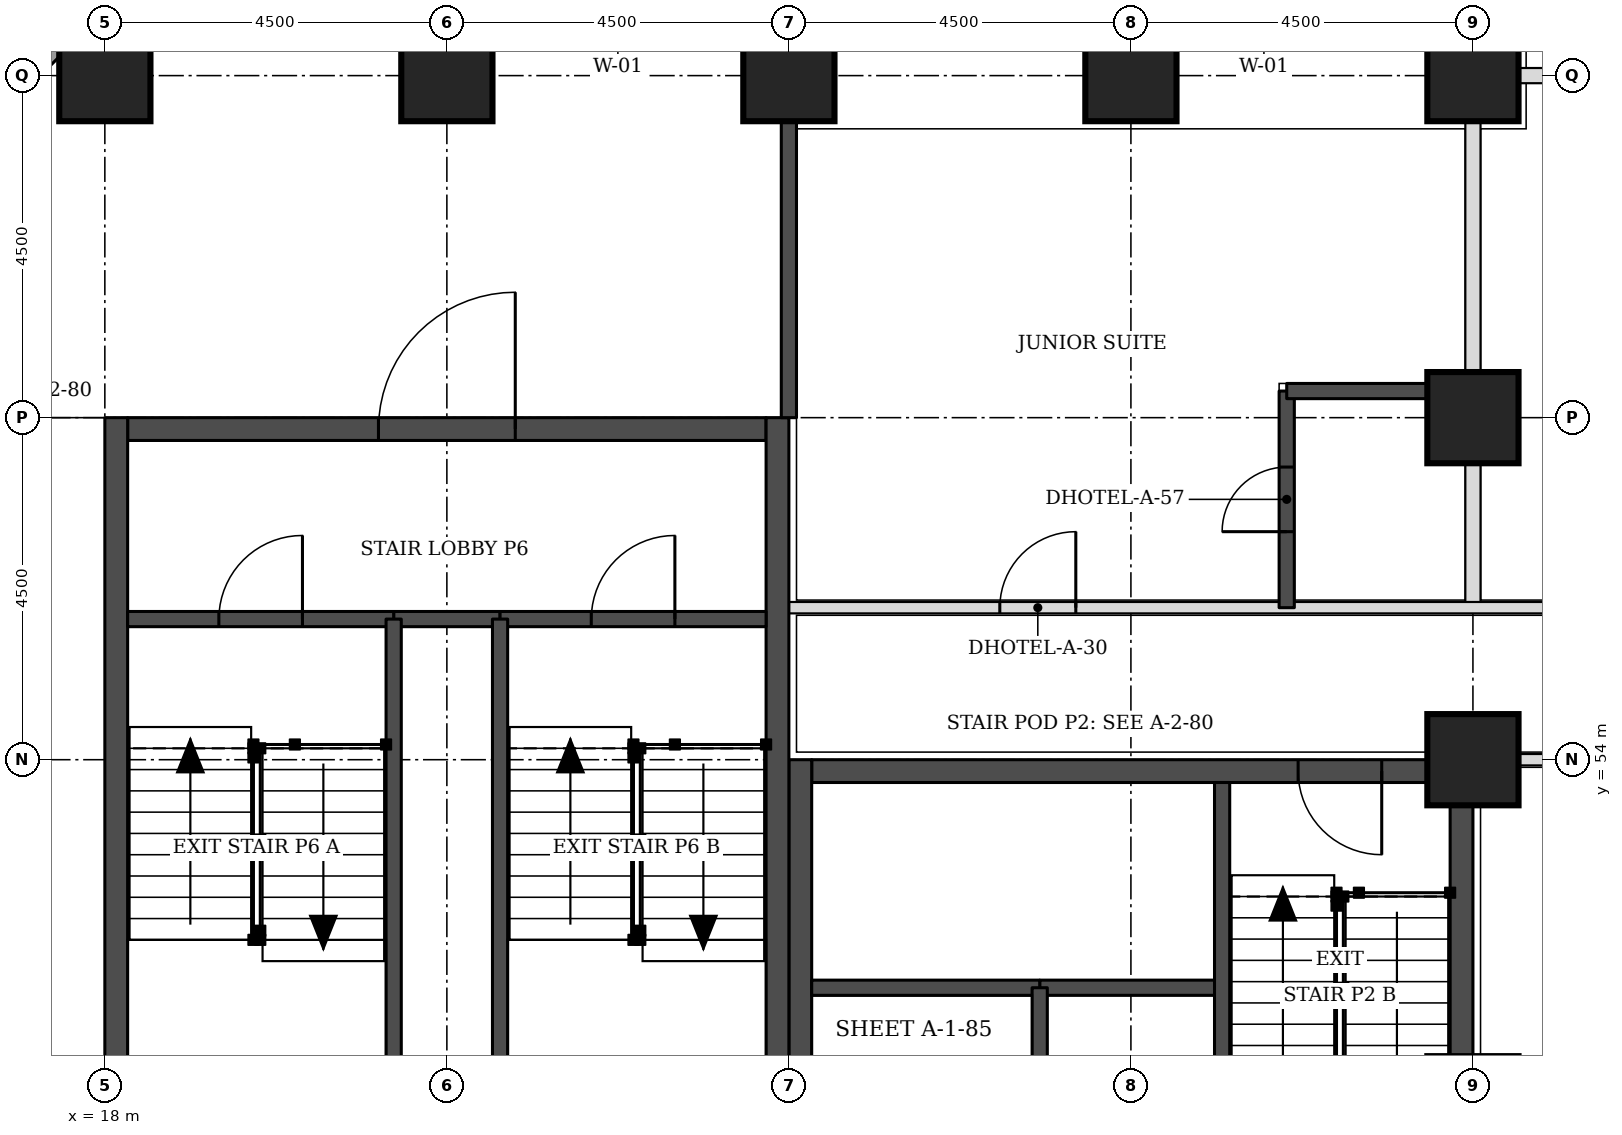
"""IFC4 building model, lengths in metres.
Left out: names, types, materials, properties, quantities, classifications, styles, units other than length and angle.
Written with IfcOpenShell. Run it as: python <this file> out.ifc"""

import sys

from ifc_helpers import new_model, si_unit, direction, frame, frame_2d, origin, origin_2d, place, context, subcontext, project, spatial, rectangle, extrude, element, fill, save


model = new_model("IFC4")
c1 = context("Model", 3, precision=1e-05, world=origin(), true_north=direction((0.0, 1.0)))
c2 = subcontext(c1, "Body", "Model", "MODEL_VIEW")
j1 = project(units=[si_unit("LENGTHUNIT", "METRE"), si_unit("PLANEANGLEUNIT", "RADIAN")], contexts=[c1])
p1 = place(None, origin())
s1 = spatial("IfcSite", under=j1, at=p1, CompositionType="ELEMENT")
p2 = place(p1, origin())
s2 = spatial("IfcBuilding", under=s1, at=p2, CompositionType="ELEMENT")
p3 = place(p2, frame((0.0, 0.0, 49.5)))
s3 = spatial("IfcBuildingStorey", under=s2, at=p3, CompositionType="ELEMENT", Elevation=49.5)
for number, where, z_axis, x_axis in (
    (1, (36.0, 54.0, 0.0), (0.0, 0.0, 1.0), (1.0, 0.0, 0.0)),
    (2, (36.0, 58.5, 0.0), (0.0, 0.0, 1.0), (1.0, 0.0, 0.0)),
    (3, (18.0, 63.0, 0.0), (0.0, 0.0, 1.0), (1.0, 0.0, 0.0)),
    (4, (22.5, 63.0, 0.0), (0.0, 0.0, 1.0), (1.0, 0.0, 0.0)),
    (5, (27.0, 63.0, 0.0), (0.0, 0.0, 1.0), (1.0, 0.0, 0.0)),
    (6, (31.5, 63.0, 0.0), (0.0, 0.0, 1.0), (1.0, 0.0, 0.0)),
    (7, (36.0, 63.0, 0.0), (0.0, 0.0, 1.0), (1.0, 0.0, 0.0)),
):
    element("IfcColumn", number, at=place(p3, frame(where, z_axis=z_axis, x_axis=x_axis)), inside=s3, PredefinedType="COLUMN", context=c2, shape_type="SweptSolid", body=[
        extrude(rectangle(XDim=1.2, YDim=1.2, at=origin_2d()), origin(), (0.0, 0.0, 1.0), 3.3),
    ])
p4 = place(p3, frame((27.3, 53.85, 0.0), z_axis=(0.0, 0.0, 1.0), x_axis=(1.0, 0.0, 0.0)))
e8 = element("IfcWall", 8, at=p4, inside=s3, PredefinedType="SHEAR", context=c2, shape_type="SweptSolid", body=[
    extrude(rectangle(XDim=8.4, YDim=0.3, at=frame_2d((4.2, 0.0))), origin(), (0.0, 0.0, 1.0), 3.3),
])
p5 = place(p4, frame((6.4, 0.0, 0.0)))
e9 = element("IfcOpeningElement", 9, at=p5, cuts=e8, PredefinedType="OPENING", context=c2, shape_type="SweptSolid", body=[
    extrude(rectangle(XDim=1.1, YDim=2.1, at=frame_2d((0.55, 1.05))), frame((0.0, 0.16, 0.0), z_axis=(0.0, -1.0, 0.0), x_axis=(1.0, 0.0, 0.0)), (0.0, 0.0, 1.0), 0.32),
])
p6 = place(p3, frame((27.15, 45.0, 0.0), z_axis=(0.0, 0.0, 1.0), x_axis=(0.0, 1.0, 0.0)))
e10 = element("IfcWall", 10, at=p6, inside=s3, PredefinedType="SHEAR", context=c2, shape_type="SweptSolid", body=[
    extrude(rectangle(XDim=9.0, YDim=0.3, at=frame_2d((4.5, 0.0))), origin(), (0.0, 0.0, 1.0), 3.3),
])
p7 = place(p6, frame((0.4, 0.0, 0.0)))
e11 = element("IfcOpeningElement", 11, at=p7, cuts=e10, PredefinedType="OPENING", context=c2, shape_type="SweptSolid", body=[
    extrude(rectangle(XDim=1.1, YDim=2.1, at=frame_2d((0.55, 1.05))), frame((0.0, 0.16, 0.0), z_axis=(0.0, -1.0, 0.0), x_axis=(1.0, 0.0, 0.0)), (0.0, 0.0, 1.0), 0.32),
])
p8 = place(p3, frame((35.85, 45.0, 0.0), z_axis=(0.0, 0.0, 1.0), x_axis=(0.0, 1.0, 0.0)))
e12 = element("IfcWall", 12, at=p8, inside=s3, PredefinedType="SHEAR", context=c2, shape_type="SweptSolid", body=[
    extrude(rectangle(XDim=9.0, YDim=0.3, at=frame_2d((4.5, 0.0))), origin(), (0.0, 0.0, 1.0), 3.3),
])
p9 = place(p3, frame((18.3, 58.35, 0.0), z_axis=(0.0, 0.0, 1.0), x_axis=(1.0, 0.0, 0.0)))
e13 = element("IfcWall", 13, at=p9, inside=s3, PredefinedType="SHEAR", context=c2, shape_type="SweptSolid", body=[
    extrude(rectangle(XDim=8.4, YDim=0.3, at=frame_2d((4.2, 0.0))), origin(), (0.0, 0.0, 1.0), 3.3),
])
p10 = place(p9, frame((3.3, 0.0, 0.0)))
e14 = element("IfcOpeningElement", 14, at=p10, cuts=e13, PredefinedType="OPENING", context=c2, shape_type="SweptSolid", body=[
    extrude(rectangle(XDim=1.8, YDim=2.1, at=frame_2d((0.9, 1.05))), frame((0.0, 0.16, 0.0), z_axis=(0.0, -1.0, 0.0), x_axis=(1.0, 0.0, 0.0)), (0.0, 0.0, 1.0), 0.32),
])
for number, where, z_axis, x_axis in (
    (15, (18.15, 49.5, 0.0), (0.0, 0.0, 1.0), (0.0, 1.0, 0.0)),
    (16, (26.85, 49.5, 0.0), (0.0, 0.0, 1.0), (0.0, 1.0, 0.0)),
):
    element("IfcWall", number, at=place(p3, frame(where, z_axis=z_axis, x_axis=x_axis)), inside=s3, PredefinedType="SHEAR", context=c2, shape_type="SweptSolid", body=[
        extrude(rectangle(XDim=9.0, YDim=0.3, at=frame_2d((4.5, 0.0))), origin(), (0.0, 0.0, 1.0), 3.3),
    ])
p11 = place(p3, frame((17.73, 63.826, 0.0), z_axis=(0.0, 0.0, 1.0), x_axis=(-0.707106781187, -0.707106781187, 0.0)))
e17 = element("IfcWall", 17, at=p11, inside=s3, PredefinedType="STANDARD", context=c2, shape_type="SweptSolid", body=[
    extrude(rectangle(XDim=7.151, YDim=0.35, at=frame_2d((3.576, 0.0))), origin(), (0.0, 0.0, 1.0), 3.055),
])
p12 = place(p11, frame((1.926, 0.0, 0.8)))
e18 = element("IfcOpeningElement", 18, at=p12, cuts=e17, PredefinedType="OPENING", context=c2, shape_type="SweptSolid", body=[
    extrude(rectangle(XDim=3.3, YDim=1.5, at=frame_2d((1.65, 0.75))), frame((0.0, 0.185, 0.0), z_axis=(0.0, -1.0, 0.0), x_axis=(1.0, 0.0, 0.0)), (0.0, 0.0, 1.0), 0.37),
])
p13 = place(p3, frame((36.0, 56.0, 0.0), z_axis=(0.0, 0.0, 1.0), x_axis=(0.0, 1.0, 0.0)))
e19 = element("IfcWall", 19, at=p13, inside=s3, PredefinedType="PARTITIONING", context=c2, shape_type="SweptSolid", body=[
    extrude(rectangle(XDim=6.4, YDim=0.2, at=frame_2d((3.2, 0.0))), origin(), (0.0, 0.0, 1.0), 2.33),
])
p14 = place(p3, frame((36.6, 63.0, 0.0), z_axis=(0.0, 0.0, 1.0), x_axis=(1.0, 0.0, 0.0)))
e20 = element("IfcWall", 20, at=p14, inside=s3, PredefinedType="PARTITIONING", context=c2, shape_type="SweptSolid", body=[
    extrude(rectangle(XDim=6.4, YDim=0.2, at=frame_2d((3.2, 0.0))), origin(), (0.0, 0.0, 1.0), 3.08),
])
p15 = place(p3, frame((36.05, 54.0, 0.0), z_axis=(0.0, 0.0, 1.0), x_axis=(1.0, 0.0, 0.0)))
e21 = element("IfcWall", 21, at=p15, inside=s3, PredefinedType="PARTITIONING", context=c2, shape_type="SweptSolid", body=[
    extrude(rectangle(XDim=6.95, YDim=0.15, at=frame_2d((3.475, 0.0))), origin(), (0.0, 0.0, 1.0), 3.08),
])
p16 = place(p15, frame((3.0, 0.0, 0.0)))
e22 = element("IfcOpeningElement", 22, at=p16, cuts=e21, PredefinedType="OPENING", context=c2, shape_type="SweptSolid", body=[
    extrude(rectangle(XDim=0.9, YDim=2.1, at=frame_2d((0.45, 1.05))), frame((0.0, 0.085, 0.0), z_axis=(0.0, -1.0, 0.0), x_axis=(1.0, 0.0, 0.0)), (0.0, 0.0, 1.0), 0.17),
])
p17 = place(p3, frame((27.0, 56.0, 0.0), z_axis=(0.0, 0.0, 1.0), x_axis=(1.0, 0.0, 0.0)))
e23 = element("IfcWall", 23, at=p17, inside=s3, PredefinedType="PARTITIONING", context=c2, shape_type="SweptSolid", body=[
    extrude(rectangle(XDim=16.0, YDim=0.15, at=frame_2d((8.0, 0.0))), origin(), (0.0, 0.0, 1.0), 3.08),
])
p18 = place(p17, frame((2.775, 0.0, 0.0)))
e24 = element("IfcOpeningElement", 24, at=p18, cuts=e23, PredefinedType="OPENING", context=c2, shape_type="SweptSolid", body=[
    extrude(rectangle(XDim=1.0, YDim=2.1, at=frame_2d((0.5, 1.05))), frame((0.0, 0.085, 0.0), z_axis=(0.0, -1.0, 0.0), x_axis=(1.0, 0.0, 0.0)), (0.0, 0.0, 1.0), 0.17),
])
p19 = place(p3, frame((27.0, 58.5, 0.0), z_axis=(0.0, 0.0, 1.0), x_axis=(0.0, 1.0, 0.0)))
e25 = element("IfcWall", 25, at=p19, inside=s3, PredefinedType="SOLIDWALL", context=c2, shape_type="SweptSolid", body=[
    extrude(rectangle(XDim=3.9, YDim=0.2, at=frame_2d((1.95, 0.0))), origin(), (0.0, 0.0, 1.0), 3.08),
])
p20 = place(p3, frame((33.55, 56.0, 0.0), z_axis=(0.0, 0.0, 1.0), x_axis=(0.0, 1.0, 0.0)))
e26 = element("IfcWall", 26, at=p20, inside=s3, PredefinedType="SOLIDWALL", context=c2, shape_type="SweptSolid", body=[
    extrude(rectangle(XDim=2.85, YDim=0.2, at=frame_2d((1.425, 0.0))), origin(), (0.0, 0.0, 1.0), 3.08),
])
p21 = place(p20, frame((1.0, 0.0, 0.0)))
e27 = element("IfcOpeningElement", 27, at=p21, cuts=e26, PredefinedType="OPENING", context=c2, shape_type="SweptSolid", body=[
    extrude(rectangle(XDim=0.85, YDim=2.1, at=frame_2d((0.425, 1.05))), frame((0.0, 0.11, 0.0), z_axis=(0.0, -1.0, 0.0), x_axis=(1.0, 0.0, 0.0)), (0.0, 0.0, 1.0), 0.22),
])
p22 = place(p3, frame((33.55, 58.85, 0.0), z_axis=(0.0, 0.0, 1.0), x_axis=(1.0, 0.0, 0.0)))
e28 = element("IfcWall", 28, at=p22, inside=s3, PredefinedType="SOLIDWALL", context=c2, shape_type="SweptSolid", body=[
    extrude(rectangle(XDim=2.45, YDim=0.2, at=frame_2d((1.225, 0.0))), origin(), (0.0, 0.0, 1.0), 3.08),
])
p23 = place(p3, frame((30.3, 51.0, 0.0), z_axis=(0.0, 0.0, 1.0), x_axis=(1.0, 0.0, 0.0)))
e29 = element("IfcWall", 29, at=p23, inside=s3, PredefinedType="SOLIDWALL", context=c2, shape_type="SweptSolid", body=[
    extrude(rectangle(XDim=2.4, YDim=0.2, at=frame_2d((1.2, 0.0))), origin(), (0.0, 0.0, 1.0), 3.3),
])
p24 = place(p3, frame((27.3, 51.0, 0.0), z_axis=(0.0, 0.0, 1.0), x_axis=(1.0, 0.0, 0.0)))
e30 = element("IfcWall", 30, at=p24, inside=s3, PredefinedType="SOLIDWALL", context=c2, shape_type="SweptSolid", body=[
    extrude(rectangle(XDim=3.0, YDim=0.2, at=frame_2d((1.5, 0.0))), origin(), (0.0, 0.0, 1.0), 3.08),
])
for number, where, z_axis, x_axis in (
    (31, (30.3, 45.3, 0.0), (0.0, 0.0, 1.0), (0.0, 1.0, 0.0)),
    (32, (32.7, 48.0, 0.0), (0.0, 0.0, 1.0), (0.0, 1.0, 0.0)),
):
    element("IfcWall", number, at=place(p3, frame(where, z_axis=z_axis, x_axis=x_axis)), inside=s3, PredefinedType="SOLIDWALL", context=c2, shape_type="SweptSolid", body=[
        extrude(rectangle(XDim=5.7, YDim=0.2, at=frame_2d((2.85, 0.0))), origin(), (0.0, 0.0, 1.0), 3.08),
    ])
p25 = place(p3, frame((21.8, 55.85, 0.0), z_axis=(0.0, 0.0, 1.0), x_axis=(1.0, 0.0, 0.0)))
e33 = element("IfcWall", 33, at=p25, inside=s3, PredefinedType="SOLIDWALL", context=c2, shape_type="SweptSolid", body=[
    extrude(rectangle(XDim=1.4, YDim=0.2, at=frame_2d((0.7, 0.0))), origin(), (0.0, 0.0, 1.0), 3.08),
])
p26 = place(p3, frame((18.3, 55.85, 0.0), z_axis=(0.0, 0.0, 1.0), x_axis=(1.0, 0.0, 0.0)))
e34 = element("IfcWall", 34, at=p26, inside=s3, PredefinedType="SOLIDWALL", context=c2, shape_type="SweptSolid", body=[
    extrude(rectangle(XDim=3.5, YDim=0.2, at=frame_2d((1.75, 0.0))), origin(), (0.0, 0.0, 1.0), 3.08),
])
p27 = place(p26, frame((1.2, 0.0, 0.0)))
e35 = element("IfcOpeningElement", 35, at=p27, cuts=e34, PredefinedType="OPENING", context=c2, shape_type="SweptSolid", body=[
    extrude(rectangle(XDim=1.1, YDim=2.1, at=frame_2d((0.55, 1.05))), frame((0.0, 0.11, 0.0), z_axis=(0.0, -1.0, 0.0), x_axis=(1.0, 0.0, 0.0)), (0.0, 0.0, 1.0), 0.22),
])
p28 = place(p3, frame((23.2, 55.85, 0.0), z_axis=(0.0, 0.0, 1.0), x_axis=(1.0, 0.0, 0.0)))
e36 = element("IfcWall", 36, at=p28, inside=s3, PredefinedType="SOLIDWALL", context=c2, shape_type="SweptSolid", body=[
    extrude(rectangle(XDim=3.5, YDim=0.2, at=frame_2d((1.75, 0.0))), origin(), (0.0, 0.0, 1.0), 3.08),
])
p29 = place(p28, frame((1.2, 0.0, 0.0)))
e37 = element("IfcOpeningElement", 37, at=p29, cuts=e36, PredefinedType="OPENING", context=c2, shape_type="SweptSolid", body=[
    extrude(rectangle(XDim=1.1, YDim=2.1, at=frame_2d((0.55, 1.05))), frame((0.0, 0.11, 0.0), z_axis=(0.0, -1.0, 0.0), x_axis=(1.0, 0.0, 0.0)), (0.0, 0.0, 1.0), 0.22),
])
for number, where, z_axis, x_axis in (
    (38, (21.8, 49.8, 0.0), (0.0, 0.0, 1.0), (0.0, 1.0, 0.0)),
    (39, (23.2, 49.8, 0.0), (0.0, 0.0, 1.0), (0.0, 1.0, 0.0)),
):
    element("IfcWall", number, at=place(p3, frame(where, z_axis=z_axis, x_axis=x_axis)), inside=s3, PredefinedType="SOLIDWALL", context=c2, shape_type="SweptSolid", body=[
        extrude(rectangle(XDim=6.05, YDim=0.2, at=frame_2d((3.025, 0.0))), origin(), (0.0, 0.0, 1.0), 3.08),
    ])
p30 = place(p18, origin())
e40 = element("IfcDoor", 40, at=p30, inside=s3, OperationType="SINGLE_SWING_RIGHT", PredefinedType="DOOR", context=c2, shape_type="SweptSolid", body=[
    extrude(rectangle(XDim=1.0, YDim=2.1, at=frame_2d((0.5, 1.05))), frame((0.0, 0.025, 0.0), z_axis=(0.0, -1.0, 0.0), x_axis=(1.0, 0.0, 0.0)), (0.0, 0.0, 1.0), 0.05),
])
fill(e24, e40)
p31 = place(p21, origin())
e41 = element("IfcDoor", 41, at=p31, inside=s3, OperationType="SINGLE_SWING_LEFT", PredefinedType="DOOR", context=c2, shape_type="SweptSolid", body=[
    extrude(rectangle(XDim=0.85, YDim=2.1, at=frame_2d((0.425, 1.05))), frame((0.0, 0.025, 0.0), z_axis=(0.0, -1.0, 0.0), x_axis=(1.0, 0.0, 0.0)), (0.0, 0.0, 1.0), 0.05),
])
fill(e27, e41)
p32 = place(p5, frame((1.1, 0.0, 0.0), z_axis=(0.0, 0.0, 1.0), x_axis=(-1.0, 0.0, 0.0)))
e42 = element("IfcDoor", 42, at=p32, inside=s3, OperationType="SINGLE_SWING_LEFT", PredefinedType="DOOR", context=c2, shape_type="SweptSolid", body=[
    extrude(rectangle(XDim=1.1, YDim=2.1, at=frame_2d((0.55, 1.05))), frame((0.0, 0.025, 0.0), z_axis=(0.0, -1.0, 0.0), x_axis=(1.0, 0.0, 0.0)), (0.0, 0.0, 1.0), 0.05),
])
fill(e9, e42)
p33 = place(p27, origin())
e43 = element("IfcDoor", 43, at=p33, inside=s3, OperationType="SINGLE_SWING_RIGHT", PredefinedType="DOOR", context=c2, shape_type="SweptSolid", body=[
    extrude(rectangle(XDim=1.1, YDim=2.1, at=frame_2d((0.55, 1.05))), frame((0.0, 0.025, 0.0), z_axis=(0.0, -1.0, 0.0), x_axis=(1.0, 0.0, 0.0)), (0.0, 0.0, 1.0), 0.05),
])
fill(e35, e43)
p34 = place(p29, origin())
e44 = element("IfcDoor", 44, at=p34, inside=s3, OperationType="SINGLE_SWING_RIGHT", PredefinedType="DOOR", context=c2, shape_type="SweptSolid", body=[
    extrude(rectangle(XDim=1.1, YDim=2.1, at=frame_2d((0.55, 1.05))), frame((0.0, 0.025, 0.0), z_axis=(0.0, -1.0, 0.0), x_axis=(1.0, 0.0, 0.0)), (0.0, 0.0, 1.0), 0.05),
])
fill(e37, e44)
p35 = place(p10, origin())
e45 = element("IfcDoor", 45, at=p35, inside=s3, OperationType="SINGLE_SWING_RIGHT", PredefinedType="DOOR", context=c2, shape_type="SweptSolid", body=[
    extrude(rectangle(XDim=1.8, YDim=2.1, at=frame_2d((0.9, 1.05))), frame((0.0, 0.025, 0.0), z_axis=(0.0, -1.0, 0.0), x_axis=(1.0, 0.0, 0.0)), (0.0, 0.0, 1.0), 0.05),
])
fill(e14, e45)
save(model, sys.argv[1])
